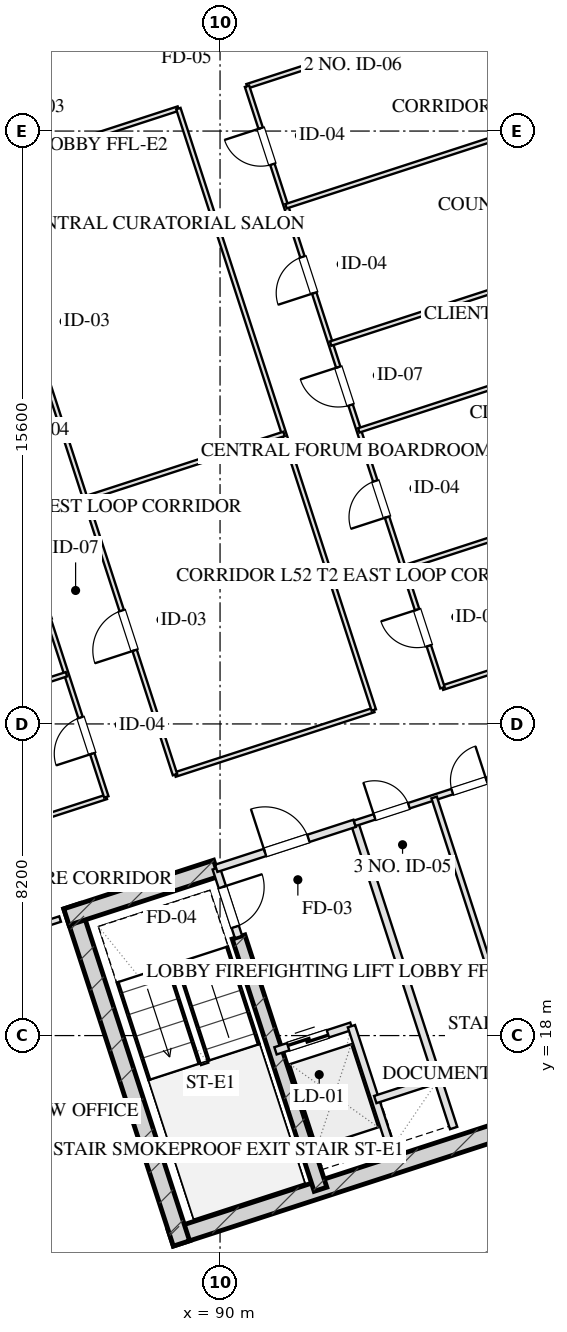
"""IFC4 building model, lengths in metres.
Left out: names, types, materials, properties, quantities, classifications, styles, units other than length and angle.
Written with IfcOpenShell. Run it as: python <this file> out.ifc"""

import sys

from ifc_helpers import new_model, si_unit, direction, frame, frame_2d, origin, origin_2d, place, context, subcontext, project, spatial, rectangle, hollow_rectangle, extrude, element, fill, save


model = new_model("IFC4")
c1 = context("Model", 3, precision=1e-05, world=origin(), true_north=direction((0.0, 1.0)))
c2 = subcontext(c1, "Body", "Model", "MODEL_VIEW")
j1 = project(units=[si_unit("LENGTHUNIT", "METRE"), si_unit("PLANEANGLEUNIT", "RADIAN")], contexts=[c1])
p1 = place(None, origin())
s1 = spatial("IfcSite", under=j1, at=p1, CompositionType="ELEMENT")
p2 = place(p1, origin())
s2 = spatial("IfcBuilding", under=s1, at=p2, CompositionType="ELEMENT")
p3 = place(p2, frame((0.0, 0.0, 195.5)))
s3 = spatial("IfcBuildingStorey", under=s2, at=p3, CompositionType="ELEMENT", Elevation=195.5)
p4 = place(p3, frame((88.701, 12.675, 0.0), z_axis=(0.0, 0.0, 1.0), x_axis=(0.95105824505, 0.309011673763, 0.0)))
e1 = element("IfcWall", 1, at=p4, inside=s3, PredefinedType="SHEAR", context=c2, shape_type="SweptSolid", body=[
    extrude(rectangle(XDim=16.25, YDim=0.45, at=frame_2d((8.125, 0.0))), origin(), (0.0, 0.0, 1.0), 3.45),
])
p5 = place(p3, frame((86.102, 21.404, 0.0), z_axis=(0.0, 0.0, 1.0), x_axis=(0.309035778627, -0.951050412717, 0.0)))
e2 = element("IfcWall", 2, at=p5, inside=s3, PredefinedType="SHEAR", context=c2, shape_type="SweptSolid", body=[
    extrude(rectangle(XDim=9.33, YDim=0.45, at=frame_2d((4.665, 0.0))), origin(), (0.0, 0.0, 1.0), 3.45),
])
p6 = place(p3, frame((90.486, 20.594, 0.0), z_axis=(0.0, 0.0, 1.0), x_axis=(0.309020428229, -0.951055400562, 0.0)))
e3 = element("IfcWall", 3, at=p6, inside=s3, PredefinedType="SHEAR", context=c2, shape_type="SweptSolid", body=[
    extrude(rectangle(XDim=6.98, YDim=0.35, at=frame_2d((3.49, 0.0))), origin(), (0.0, 0.0, 1.0), 3.45),
])
p7 = place(p3, frame((85.957, 21.12, 0.0), z_axis=(0.0, 0.0, 1.0), x_axis=(0.951064796122, 0.308991510526, 0.0)))
e4 = element("IfcWall", 4, at=p7, inside=s3, PredefinedType="SHEAR", context=c2, shape_type="SweptSolid", body=[
    extrude(rectangle(XDim=4.145, YDim=0.45, at=frame_2d((2.073, 0.0))), origin(), (0.0, 0.0, 1.0), 3.45),
])
p8 = place(p3, frame((97.185, 11.888, 0.0), z_axis=(0.0, 0.0, 1.0), x_axis=(0.951056516295, 0.309016994375, 0.0)))
e5 = element("IfcColumn", 5, at=p8, inside=s3, PredefinedType="COLUMN", context=c2, shape_type="SweptSolid", body=[
    extrude(hollow_rectangle(XDim=0.8, YDim=0.8, WallThickness=0.028, at=origin_2d()), origin(), (0.0, 0.0, 1.0), 3.451),
])
p9 = place(p3, frame((109.908, 15.444, 0.0), z_axis=(0.0, 0.0, 1.0), x_axis=(-0.951057580055, -0.30901372044, 0.0)))
e6 = element("IfcWall", 6, at=p9, inside=s3, PredefinedType="SOLIDWALL", context=c2, shape_type="SweptSolid", body=[
    extrude(rectangle(XDim=26.4, YDim=0.4, at=frame_2d((13.2, 0.0))), origin(), (0.0, 0.0, 1.0), 2.61),
])
p10 = place(p3, frame((89.899, 22.401, 0.0), z_axis=(0.0, 0.0, 1.0), x_axis=(0.308932062672, -0.951084108086, 0.0)))
e7 = element("IfcWall", 7, at=p10, inside=s3, PredefinedType="PARTITIONING", context=c2, shape_type="SweptSolid", body=[
    extrude(rectangle(XDim=1.9, YDim=0.2, at=frame_2d((0.95, 0.0))), origin(), (0.0, 0.0, 1.0), 3.175),
])
p11 = place(p10, frame((0.52, 0.0, 0.0)))
e8 = element("IfcOpeningElement", 8, at=p11, cuts=e7, PredefinedType="OPENING", context=c2, shape_type="SweptSolid", body=[
    extrude(rectangle(XDim=1.1, YDim=2.05, at=frame_2d((0.55, 1.025))), frame((0.0, 0.11, 0.0), z_axis=(0.0, -1.0, 0.0), x_axis=(1.0, 0.0, 0.0)), (0.0, 0.0, 1.0), 0.22),
])
p12 = place(p3, frame((93.542, 23.585, 0.0), z_axis=(0.0, 0.0, 1.0), x_axis=(0.309042196757, -0.951048327176, 0.0)))
e9 = element("IfcWall", 9, at=p12, inside=s3, PredefinedType="PARTITIONING", context=c2, shape_type="SweptSolid", body=[
    extrude(rectangle(XDim=8.43, YDim=0.2, at=frame_2d((4.215, 0.0))), origin(), (0.0, 0.0, 1.0), 3.175),
])
p13 = place(p3, frame((89.899, 22.401, 0.0), z_axis=(0.0, 0.0, 1.0), x_axis=(0.951046716504, 0.309047153403, 0.0)))
e10 = element("IfcWall", 10, at=p13, inside=s3, PredefinedType="PARTITIONING", context=c2, shape_type="SweptSolid", body=[
    extrude(rectangle(XDim=3.83, YDim=0.2, at=frame_2d((1.915, 0.0))), origin(), (0.0, 0.0, 1.0), 3.175),
])
p14 = place(p13, frame((1.35, 0.0, 0.0)))
e11 = element("IfcOpeningElement", 11, at=p14, cuts=e10, PredefinedType="OPENING", context=c2, shape_type="SweptSolid", body=[
    extrude(rectangle(XDim=1.2, YDim=2.05, at=frame_2d((0.6, 1.025))), frame((0.0, 0.11, 0.0), z_axis=(0.0, -1.0, 0.0), x_axis=(1.0, 0.0, 0.0)), (0.0, 0.0, 1.0), 0.22),
])
p15 = place(p3, frame((91.46, 17.598, 0.0), z_axis=(0.0, 0.0, 1.0), x_axis=(0.951062257173, 0.308999325213, 0.0)))
e12 = element("IfcWall", 12, at=p15, inside=s3, PredefinedType="PARTITIONING", context=c2, shape_type="SweptSolid", body=[
    extrude(rectangle(XDim=2.1, YDim=0.2, at=frame_2d((1.05, 0.0))), origin(), (0.0, 0.0, 1.0), 3.175),
])
p16 = place(p15, frame((0.35, 0.0, 0.0)))
e13 = element("IfcOpeningElement", 13, at=p16, cuts=e12, PredefinedType="OPENING", context=c2, shape_type="SweptSolid", body=[
    extrude(rectangle(XDim=1.1, YDim=2.05, at=frame_2d((0.55, 1.025))), frame((0.0, 0.11, 0.0), z_axis=(0.0, -1.0, 0.0), x_axis=(1.0, 0.0, 0.0)), (0.0, 0.0, 1.0), 0.22),
])
p17 = place(p3, frame((93.457, 18.247, 0.0), z_axis=(0.0, 0.0, 1.0), x_axis=(0.3089935693, -0.951064127245, 0.0)))
e14 = element("IfcWall", 14, at=p17, inside=s3, PredefinedType="PARTITIONING", context=c2, shape_type="SweptSolid", body=[
    extrude(rectangle(XDim=3.7, YDim=0.2, at=frame_2d((1.85, 0.0))), origin(), (0.0, 0.0, 1.0), 3.175),
])
p18 = place(p3, frame((94.084, 16.317, 0.0), z_axis=(0.0, 0.0, 1.0), x_axis=(0.951041328149, 0.309063734775, 0.0)))
e15 = element("IfcWall", 15, at=p18, inside=s3, PredefinedType="PARTITIONING", context=c2, shape_type="SweptSolid", body=[
    extrude(rectangle(XDim=1.73, YDim=0.2, at=frame_2d((0.865, 0.0))), origin(), (0.0, 0.0, 1.0), 3.175),
])
p19 = place(p3, frame((93.542, 23.585, 0.0), z_axis=(0.0, 0.0, 1.0), x_axis=(0.951063829732, 0.308994485023, 0.0)))
e16 = element("IfcWall", 16, at=p19, inside=s3, PredefinedType="PARTITIONING", context=c2, shape_type="SweptSolid", body=[
    extrude(rectangle(XDim=4.4, YDim=0.15, at=frame_2d((2.2, 0.0))), origin(), (0.0, 0.0, 1.0), 3.175),
])
p20 = place(p19, frame((0.55, 0.0, 0.0)))
e17 = element("IfcOpeningElement", 17, at=p20, cuts=e16, PredefinedType="OPENING", context=c2, shape_type="SweptSolid", body=[
    extrude(rectangle(XDim=0.95, YDim=2.05, at=frame_2d((0.475, 1.025))), frame((0.0, 0.085, 0.0), z_axis=(0.0, -1.0, 0.0), x_axis=(1.0, 0.0, 0.0)), (0.0, 0.0, 1.0), 0.17),
])
p21 = place(p19, frame((2.7, 0.0, 0.0)))
e18 = element("IfcOpeningElement", 18, at=p21, cuts=e16, PredefinedType="OPENING", context=c2, shape_type="SweptSolid", body=[
    extrude(rectangle(XDim=0.95, YDim=2.05, at=frame_2d((0.475, 1.025))), frame((0.0, 0.085, 0.0), z_axis=(0.0, -1.0, 0.0), x_axis=(1.0, 0.0, 0.0)), (0.0, 0.0, 1.0), 0.17),
])
p22 = place(p3, frame((95.634, 24.265, 0.0), z_axis=(0.0, 0.0, 1.0), x_axis=(0.309007490203, -0.951059604335, 0.0)))
e19 = element("IfcWall", 19, at=p22, inside=s3, PredefinedType="PARTITIONING", context=c2, shape_type="SweptSolid", body=[
    extrude(rectangle(XDim=8.43, YDim=0.15, at=frame_2d((4.215, 0.0))), origin(), (0.0, 0.0, 1.0), 3.175),
])
p23 = place(p3, frame((83.101, 43.324, 0.0), z_axis=(0.0, 0.0, 1.0), x_axis=(0.951052804469, 0.309028417967, 0.0)))
e20 = element("IfcWall", 20, at=p23, inside=s3, PredefinedType="PARTITIONING", context=c2, shape_type="SweptSolid", body=[
    extrude(rectangle(XDim=3.83, YDim=0.2, at=frame_2d((1.915, 0.0))), origin(), (0.0, 0.0, 1.0), 3.175),
])
p24 = place(p23, frame((1.35, 0.0, 0.0)))
e21 = element("IfcOpeningElement", 21, at=p24, cuts=e20, PredefinedType="OPENING", context=c2, shape_type="SweptSolid", body=[
    extrude(rectangle(XDim=1.2, YDim=2.05, at=frame_2d((0.6, 1.025))), frame((0.0, 0.11, 0.0), z_axis=(0.0, -1.0, 0.0), x_axis=(1.0, 0.0, 0.0)), (0.0, 0.0, 1.0), 0.22),
])
p25 = place(p3, frame((78.753, 18.78, 0.0), z_axis=(0.0, 0.0, 1.0), x_axis=(0.951060977215, 0.309003264738, 0.0)))
e22 = element("IfcWall", 22, at=p25, inside=s3, PredefinedType="PARTITIONING", context=c2, shape_type="SweptSolid", body=[
    extrude(rectangle(XDim=7.4, YDim=0.15, at=frame_2d((3.7, 0.0))), origin(), (0.0, 0.0, 1.0), 2.15),
])
p26 = place(p25, frame((3.108, 0.0, 0.0)))
e23 = element("IfcOpeningElement", 23, at=p26, cuts=e22, PredefinedType="OPENING", context=c2, shape_type="SweptSolid", body=[
    extrude(rectangle(XDim=1.0, YDim=2.05, at=frame_2d((0.5, 1.025))), frame((0.0, 0.085, 0.0), z_axis=(0.0, -1.0, 0.0), x_axis=(1.0, 0.0, 0.0)), (0.0, 0.0, 1.0), 0.17),
])
p27 = place(p3, frame((77.925, 21.328, 0.0), z_axis=(0.0, 0.0, 1.0), x_axis=(0.951053980838, 0.309024797601, 0.0)))
e24 = element("IfcWall", 24, at=p27, inside=s3, PredefinedType="PARTITIONING", context=c2, shape_type="SweptSolid", body=[
    extrude(rectangle(XDim=9.55, YDim=0.12, at=frame_2d((4.775, 0.0))), origin(), (0.0, 0.0, 1.0), 3.175),
])
p28 = place(p3, frame((88.814, 24.867, 0.0), z_axis=(0.0, 0.0, 1.0), x_axis=(0.951061793147, 0.309000753423, 0.0)))
e25 = element("IfcWall", 25, at=p28, inside=s3, PredefinedType="PARTITIONING", context=c2, shape_type="SweptSolid", body=[
    extrude(rectangle(XDim=5.5, YDim=0.12, at=frame_2d((2.75, 0.0))), origin(), (0.0, 0.0, 1.0), 3.175),
])
p29 = place(p3, frame((95.852, 27.153, 0.0), z_axis=(0.0, 0.0, 1.0), x_axis=(0.951054485045, 0.30902324585, 0.0)))
e26 = element("IfcWall", 26, at=p29, inside=s3, PredefinedType="PARTITIONING", context=c2, shape_type="SweptSolid", body=[
    extrude(rectangle(XDim=11.95, YDim=0.12, at=frame_2d((5.975, 0.0))), origin(), (0.0, 0.0, 1.0), 3.175),
])
p30 = place(p3, frame((83.672, 40.692, 0.0), z_axis=(0.0, 0.0, 1.0), x_axis=(0.951048747115, 0.30904090443, 0.0)))
e27 = element("IfcWall", 27, at=p30, inside=s3, PredefinedType="PARTITIONING", context=c2, shape_type="SweptSolid", body=[
    extrude(rectangle(XDim=5.5, YDim=0.12, at=frame_2d((2.75, 0.0))), origin(), (0.0, 0.0, 1.0), 3.175),
])
p31 = place(p3, frame((90.71, 42.979, 0.0), z_axis=(0.0, 0.0, 1.0), x_axis=(0.95105853842, 0.309010770845, 0.0)))
e28 = element("IfcWall", 28, at=p31, inside=s3, PredefinedType="PARTITIONING", context=c2, shape_type="SweptSolid", body=[
    extrude(rectangle(XDim=11.95, YDim=0.12, at=frame_2d((5.975, 0.0))), origin(), (0.0, 0.0, 1.0), 3.175),
])
p32 = place(p3, frame((87.007, 24.28, 0.0), z_axis=(0.0, 0.0, 1.0), x_axis=(-0.309022042254, 0.951054876125, 0.0)))
e29 = element("IfcWall", 29, at=p32, inside=s3, PredefinedType="PARTITIONING", context=c2, shape_type="SweptSolid", body=[
    extrude(rectangle(XDim=16.64, YDim=0.12, at=frame_2d((8.32, 0.0))), origin(), (0.0, 0.0, 1.0), 3.175),
])
p33 = place(p32, frame((1.197, 0.0, 0.0)))
e30 = element("IfcOpeningElement", 30, at=p33, cuts=e29, PredefinedType="OPENING", context=c2, shape_type="SweptSolid", body=[
    extrude(rectangle(XDim=1.0, YDim=2.05, at=frame_2d((0.5, 1.025))), frame((0.0, 0.07, 0.0), z_axis=(0.0, -1.0, 0.0), x_axis=(1.0, 0.0, 0.0)), (0.0, 0.0, 1.0), 0.14),
])
p34 = place(p32, frame((4.891, 0.0, 0.0)))
e31 = element("IfcOpeningElement", 31, at=p34, cuts=e29, PredefinedType="OPENING", context=c2, shape_type="SweptSolid", body=[
    extrude(rectangle(XDim=1.05, YDim=2.05, at=frame_2d((0.525, 1.025))), frame((0.0, 0.07, 0.0), z_axis=(0.0, -1.0, 0.0), x_axis=(1.0, 0.0, 0.0)), (0.0, 0.0, 1.0), 0.14),
])
p35 = place(p32, frame((9.354, 0.0, 0.0)))
e32 = element("IfcOpeningElement", 32, at=p35, cuts=e29, PredefinedType="OPENING", context=c2, shape_type="SweptSolid", body=[
    extrude(rectangle(XDim=1.0, YDim=2.05, at=frame_2d((0.5, 1.025))), frame((0.0, 0.07, 0.0), z_axis=(0.0, -1.0, 0.0), x_axis=(1.0, 0.0, 0.0)), (0.0, 0.0, 1.0), 0.14),
])
p36 = place(p32, frame((13.98, 0.0, 0.0)))
e33 = element("IfcOpeningElement", 33, at=p36, cuts=e29, PredefinedType="OPENING", context=c2, shape_type="SweptSolid", body=[
    extrude(rectangle(XDim=1.0, YDim=2.05, at=frame_2d((0.5, 1.025))), frame((0.0, 0.07, 0.0), z_axis=(0.0, -1.0, 0.0), x_axis=(1.0, 0.0, 0.0)), (0.0, 0.0, 1.0), 0.14),
])
p37 = place(p3, frame((88.814, 24.867, 0.0), z_axis=(0.0, 0.0, 1.0), x_axis=(-0.309022042254, 0.951054876125, 0.0)))
e34 = element("IfcWall", 34, at=p37, inside=s3, PredefinedType="PARTITIONING", context=c2, shape_type="SweptSolid", body=[
    extrude(rectangle(XDim=16.64, YDim=0.12, at=frame_2d((8.32, 0.0))), origin(), (0.0, 0.0, 1.0), 3.175),
])
p38 = place(p37, frame((3.438, 0.0, 0.0)))
e35 = element("IfcOpeningElement", 35, at=p38, cuts=e34, PredefinedType="OPENING", context=c2, shape_type="SweptSolid", body=[
    extrude(rectangle(XDim=1.1, YDim=2.05, at=frame_2d((0.55, 1.025))), frame((0.0, 0.07, 0.0), z_axis=(0.0, -1.0, 0.0), x_axis=(1.0, 0.0, 0.0)), (0.0, 0.0, 1.0), 0.14),
])
p39 = place(p37, frame((11.69, 0.0, 0.0)))
e36 = element("IfcOpeningElement", 36, at=p39, cuts=e34, PredefinedType="OPENING", context=c2, shape_type="SweptSolid", body=[
    extrude(rectangle(XDim=1.1, YDim=2.05, at=frame_2d((0.55, 1.025))), frame((0.0, 0.07, 0.0), z_axis=(0.0, -1.0, 0.0), x_axis=(1.0, 0.0, 0.0)), (0.0, 0.0, 1.0), 0.14),
])
p40 = place(p3, frame((94.045, 26.566, 0.0), z_axis=(0.0, 0.0, 1.0), x_axis=(-0.30901773025, 0.951056277195, 0.0)))
e37 = element("IfcWall", 37, at=p40, inside=s3, PredefinedType="PARTITIONING", context=c2, shape_type="SweptSolid", body=[
    extrude(rectangle(XDim=16.64, YDim=0.12, at=frame_2d((8.32, 0.0))), origin(), (0.0, 0.0, 1.0), 3.175),
])
p41 = place(p3, frame((95.852, 27.153, 0.0), z_axis=(0.0, 0.0, 1.0), x_axis=(-0.309004459387, 0.951060589068, 0.0)))
e38 = element("IfcWall", 38, at=p41, inside=s3, PredefinedType="PARTITIONING", context=c2, shape_type="SweptSolid", body=[
    extrude(rectangle(XDim=16.64, YDim=0.12, at=frame_2d((8.32, 0.0))), origin(), (0.0, 0.0, 1.0), 3.175),
])
p42 = place(p41, frame((1.16, 0.0, 0.0)))
e39 = element("IfcOpeningElement", 39, at=p42, cuts=e38, PredefinedType="OPENING", context=c2, shape_type="SweptSolid", body=[
    extrude(rectangle(XDim=1.0, YDim=2.05, at=frame_2d((0.5, 1.025))), frame((0.0, 0.07, 0.0), z_axis=(0.0, -1.0, 0.0), x_axis=(1.0, 0.0, 0.0)), (0.0, 0.0, 1.0), 0.14),
])
p43 = place(p41, frame((4.72, 0.0, 0.0)))
e40 = element("IfcOpeningElement", 40, at=p43, cuts=e38, PredefinedType="OPENING", context=c2, shape_type="SweptSolid", body=[
    extrude(rectangle(XDim=1.0, YDim=2.05, at=frame_2d((0.5, 1.025))), frame((0.0, 0.07, 0.0), z_axis=(0.0, -1.0, 0.0), x_axis=(1.0, 0.0, 0.0)), (0.0, 0.0, 1.0), 0.14),
])
p44 = place(p41, frame((7.82, 0.0, 0.0)))
e41 = element("IfcOpeningElement", 41, at=p44, cuts=e38, PredefinedType="OPENING", context=c2, shape_type="SweptSolid", body=[
    extrude(rectangle(XDim=1.05, YDim=2.05, at=frame_2d((0.525, 1.025))), frame((0.0, 0.07, 0.0), z_axis=(0.0, -1.0, 0.0), x_axis=(1.0, 0.0, 0.0)), (0.0, 0.0, 1.0), 0.14),
])
p45 = place(p41, frame((10.92, 0.0, 0.0)))
e42 = element("IfcOpeningElement", 42, at=p45, cuts=e38, PredefinedType="OPENING", context=c2, shape_type="SweptSolid", body=[
    extrude(rectangle(XDim=1.0, YDim=2.05, at=frame_2d((0.5, 1.025))), frame((0.0, 0.07, 0.0), z_axis=(0.0, -1.0, 0.0), x_axis=(1.0, 0.0, 0.0)), (0.0, 0.0, 1.0), 0.14),
])
p46 = place(p41, frame((14.48, 0.0, 0.0)))
e43 = element("IfcOpeningElement", 43, at=p46, cuts=e38, PredefinedType="OPENING", context=c2, shape_type="SweptSolid", body=[
    extrude(rectangle(XDim=1.0, YDim=2.05, at=frame_2d((0.5, 1.025))), frame((0.0, 0.07, 0.0), z_axis=(0.0, -1.0, 0.0), x_axis=(1.0, 0.0, 0.0)), (0.0, 0.0, 1.0), 0.14),
])
p47 = place(p3, frame((86.453, 32.133, 0.0), z_axis=(0.0, 0.0, 1.0), x_axis=(0.951052986339, 0.309027858251, 0.0)))
e44 = element("IfcWall", 44, at=p47, inside=s3, PredefinedType="PARTITIONING", context=c2, shape_type="SweptSolid", body=[
    extrude(rectangle(XDim=5.5, YDim=0.12, at=frame_2d((2.75, 0.0))), origin(), (0.0, 0.0, 1.0), 3.175),
])
p48 = place(p3, frame((76.876, 24.557, 0.0), z_axis=(0.0, 0.0, 1.0), x_axis=(0.951056422073, 0.309017284359, 0.0)))
e45 = element("IfcWall", 45, at=p48, inside=s3, PredefinedType="PARTITIONING", context=c2, shape_type="SweptSolid", body=[
    extrude(rectangle(XDim=9.55, YDim=0.12, at=frame_2d((4.775, 0.0))), origin(), (0.0, 0.0, 1.0), 3.175),
])
for number, where, z_axis, x_axis in (
    (46, (94.826, 30.311, 0.0), (0.0, 0.0, 1.0), (0.951, 0.309, 0.0)),
    (47, (93.652, 33.925, 0.0), (0.0, 0.0, 1.0), (0.951, 0.309, 0.0)),
):
    element("IfcWall", number, at=place(p3, frame(where, z_axis=z_axis, x_axis=x_axis)), inside=s3, PredefinedType="PARTITIONING", context=c2, shape_type="SweptSolid", body=[
        extrude(rectangle(XDim=11.95, YDim=0.12, at=frame_2d((5.975, 0.0))), origin(), (0.0, 0.0, 1.0), 3.175),
    ])
for number, where, z_axis, x_axis in (
    (48, (92.91, 36.207, 0.0), (0.0, 0.0, 1.0), (0.951, 0.309, 0.0)),
    (49, (91.736, 39.821, 0.0), (0.0, 0.0, 1.0), (0.951, 0.309, 0.0)),
):
    element("IfcWall", number, at=place(p3, frame(where, z_axis=z_axis, x_axis=x_axis)), inside=s3, PredefinedType="PARTITIONING", context=c2, shape_type="SweptSolid", body=[
        extrude(rectangle(XDim=11.95, YDim=0.12, at=frame_2d((5.975, 0.0))), origin(), (0.0, 0.0, 1.0), 3.175),
    ])
p49 = place(p11, origin())
e50 = element("IfcDoor", 50, at=p49, inside=s3, OperationType="SINGLE_SWING_LEFT", PredefinedType="DOOR", context=c2, shape_type="SweptSolid", body=[
    extrude(rectangle(XDim=1.1, YDim=2.05, at=frame_2d((0.55, 1.025))), frame((0.0, 0.025, 0.0), z_axis=(0.0, -1.0, 0.0), x_axis=(1.0, 0.0, 0.0)), (0.0, 0.0, 1.0), 0.05),
])
fill(e8, e50)
p50 = place(p14, origin())
e51 = element("IfcDoor", 51, at=p50, inside=s3, OperationType="SINGLE_SWING_LEFT", PredefinedType="DOOR", context=c2, shape_type="SweptSolid", body=[
    extrude(rectangle(XDim=1.2, YDim=2.05, at=frame_2d((0.6, 1.025))), frame((0.0, 0.025, 0.0), z_axis=(0.0, -1.0, 0.0), x_axis=(1.0, 0.0, 0.0)), (0.0, 0.0, 1.0), 0.05),
])
fill(e11, e51)
p51 = place(p16, origin())
e52 = element("IfcDoor", 52, at=p51, inside=s3, OperationType="DOUBLE_DOOR_SLIDING", PredefinedType="DOOR", context=c2, shape_type="SweptSolid", body=[
    extrude(rectangle(XDim=1.1, YDim=2.05, at=frame_2d((0.55, 1.025))), frame((0.0, 0.025, 0.0), z_axis=(0.0, -1.0, 0.0), x_axis=(1.0, 0.0, 0.0)), (0.0, 0.0, 1.0), 0.05),
])
fill(e13, e52)
p52 = place(p20, origin())
e53 = element("IfcDoor", 53, at=p52, inside=s3, OperationType="SINGLE_SWING_LEFT", PredefinedType="DOOR", context=c2, shape_type="SweptSolid", body=[
    extrude(rectangle(XDim=0.95, YDim=2.05, at=frame_2d((0.475, 1.025))), frame((0.0, 0.025, 0.0), z_axis=(0.0, -1.0, 0.0), x_axis=(1.0, 0.0, 0.0)), (0.0, 0.0, 1.0), 0.05),
])
fill(e17, e53)
p53 = place(p21, origin())
e54 = element("IfcDoor", 54, at=p53, inside=s3, OperationType="SINGLE_SWING_RIGHT", PredefinedType="DOOR", context=c2, shape_type="SweptSolid", body=[
    extrude(rectangle(XDim=0.95, YDim=2.05, at=frame_2d((0.475, 1.025))), frame((0.0, 0.025, 0.0), z_axis=(0.0, -1.0, 0.0), x_axis=(1.0, 0.0, 0.0)), (0.0, 0.0, 1.0), 0.05),
])
fill(e18, e54)
p54 = place(p33, origin())
e55 = element("IfcDoor", 55, at=p54, inside=s3, OperationType="SINGLE_SWING_LEFT", PredefinedType="DOOR", context=c2, shape_type="SweptSolid", body=[
    extrude(rectangle(XDim=1.0, YDim=2.05, at=frame_2d((0.5, 1.025))), frame((0.0, 0.025, 0.0), z_axis=(0.0, -1.0, 0.0), x_axis=(1.0, 0.0, 0.0)), (0.0, 0.0, 1.0), 0.05),
])
fill(e30, e55)
p55 = place(p38, origin())
e56 = element("IfcDoor", 56, at=p55, inside=s3, OperationType="SINGLE_SWING_LEFT", PredefinedType="DOOR", context=c2, shape_type="SweptSolid", body=[
    extrude(rectangle(XDim=1.1, YDim=2.05, at=frame_2d((0.55, 1.025))), frame((0.0, 0.025, 0.0), z_axis=(0.0, -1.0, 0.0), x_axis=(1.0, 0.0, 0.0)), (0.0, 0.0, 1.0), 0.05),
])
fill(e35, e56)
p56 = place(p42, origin())
e57 = element("IfcDoor", 57, at=p56, inside=s3, OperationType="SINGLE_SWING_RIGHT", PredefinedType="DOOR", context=c2, shape_type="SweptSolid", body=[
    extrude(rectangle(XDim=1.0, YDim=2.05, at=frame_2d((0.5, 1.025))), frame((0.0, 0.025, 0.0), z_axis=(0.0, -1.0, 0.0), x_axis=(1.0, 0.0, 0.0)), (0.0, 0.0, 1.0), 0.05),
])
fill(e39, e57)
p57 = place(p43, origin())
e58 = element("IfcDoor", 58, at=p57, inside=s3, OperationType="SINGLE_SWING_LEFT", PredefinedType="DOOR", context=c2, shape_type="SweptSolid", body=[
    extrude(rectangle(XDim=1.0, YDim=2.05, at=frame_2d((0.5, 1.025))), frame((0.0, 0.025, 0.0), z_axis=(0.0, -1.0, 0.0), x_axis=(1.0, 0.0, 0.0)), (0.0, 0.0, 1.0), 0.05),
])
fill(e40, e58)
p58 = place(p44, origin())
e59 = element("IfcDoor", 59, at=p58, inside=s3, OperationType="SINGLE_SWING_RIGHT", PredefinedType="DOOR", context=c2, shape_type="SweptSolid", body=[
    extrude(rectangle(XDim=1.05, YDim=2.05, at=frame_2d((0.525, 1.025))), frame((0.0, 0.025, 0.0), z_axis=(0.0, -1.0, 0.0), x_axis=(1.0, 0.0, 0.0)), (0.0, 0.0, 1.0), 0.05),
])
fill(e41, e59)
p59 = place(p45, origin())
e60 = element("IfcDoor", 60, at=p59, inside=s3, OperationType="SINGLE_SWING_LEFT", PredefinedType="DOOR", context=c2, shape_type="SweptSolid", body=[
    extrude(rectangle(XDim=1.0, YDim=2.05, at=frame_2d((0.5, 1.025))), frame((0.0, 0.025, 0.0), z_axis=(0.0, -1.0, 0.0), x_axis=(1.0, 0.0, 0.0)), (0.0, 0.0, 1.0), 0.05),
])
fill(e42, e60)
p60 = place(p46, origin())
e61 = element("IfcDoor", 61, at=p60, inside=s3, OperationType="SINGLE_SWING_RIGHT", PredefinedType="DOOR", context=c2, shape_type="SweptSolid", body=[
    extrude(rectangle(XDim=1.0, YDim=2.05, at=frame_2d((0.5, 1.025))), frame((0.0, 0.025, 0.0), z_axis=(0.0, -1.0, 0.0), x_axis=(1.0, 0.0, 0.0)), (0.0, 0.0, 1.0), 0.05),
])
fill(e43, e61)
save(model, sys.argv[1])
